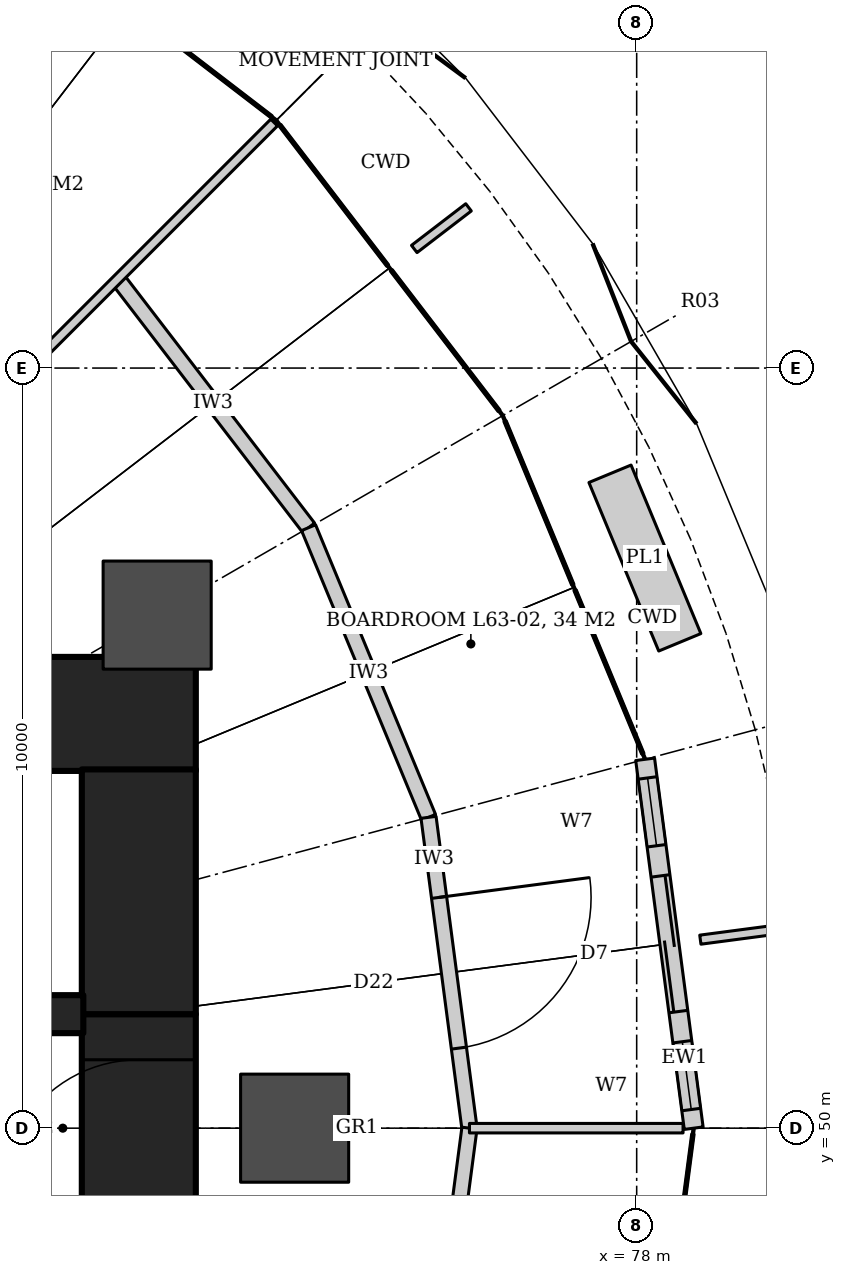
"""IFC4 building model, lengths in metres.
Left out: names, types, materials, properties, quantities, classifications, styles, units other than length and angle.
Written with IfcOpenShell. Run it as: python <this file> out.ifc"""

import sys

from ifc_helpers import new_model, si_unit, direction, frame, frame_2d, origin, origin_2d, place, context, subcontext, project, spatial, rectangle, hollow_circle, extrude, element, fill, save


model = new_model("IFC4")
c1 = context("Model", 3, precision=1e-05, world=origin(), true_north=direction((0.0, 1.0)))
c2 = subcontext(c1, "Body", "Model", "MODEL_VIEW")
j1 = project(units=[si_unit("LENGTHUNIT", "METRE"), si_unit("PLANEANGLEUNIT", "RADIAN")], contexts=[c1])
p1 = place(None, origin())
s1 = spatial("IfcSite", under=j1, at=p1, CompositionType="ELEMENT")
p2 = place(p1, origin())
s2 = spatial("IfcBuilding", under=s1, at=p2, CompositionType="ELEMENT")
p3 = place(p2, frame((0.0, 0.0, 269.6)))
s3 = spatial("IfcBuildingStorey", under=s2, at=p3, CompositionType="ELEMENT", Elevation=269.6)
p4 = place(p3, frame((64.6, 55.45, 0.0), z_axis=(0.0, 0.0, 1.0), x_axis=(1.0, 0.0, 0.0)))
e1 = element("IfcWall", 1, at=p4, inside=s3, PredefinedType="SHEAR", context=c2, shape_type="SweptSolid", body=[
    extrude(rectangle(XDim=7.6, YDim=1.5, at=frame_2d((3.8, 0.0))), origin(), (0.0, 0.0, 1.0), 4.2),
])
p5 = place(p3, frame((71.45, 48.5, 0.0), z_axis=(0.0, 0.0, 1.0), x_axis=(0.0, 1.0, 0.0)))
e2 = element("IfcWall", 2, at=p5, inside=s3, PredefinedType="SHEAR", context=c2, shape_type="SweptSolid", body=[
    extrude(rectangle(XDim=3.0, YDim=1.5, at=frame_2d((1.5, 0.0))), origin(), (0.0, 0.0, 1.0), 4.2),
])
p6 = place(p5, frame((0.6, 0.0, 0.0)))
e3 = element("IfcOpeningElement", 3, at=p6, cuts=e2, PredefinedType="OPENING", context=c2, shape_type="SweptSolid", body=[
    extrude(rectangle(XDim=1.8, YDim=2.1, at=frame_2d((0.9, 1.05))), frame((0.0, 0.76, 0.0), z_axis=(0.0, -1.0, 0.0), x_axis=(1.0, 0.0, 0.0)), (0.0, 0.0, 1.0), 1.52),
])
p7 = place(p3, frame((71.45, 51.5, 0.0), z_axis=(0.0, 0.0, 1.0), x_axis=(0.0, 1.0, 0.0)))
e4 = element("IfcWall", 4, at=p7, inside=s3, PredefinedType="SHEAR", context=c2, shape_type="SweptSolid", body=[
    extrude(rectangle(XDim=3.22, YDim=1.5, at=frame_2d((1.61, 0.0))), origin(), (0.0, 0.0, 1.0), 4.2),
])
p8 = place(p3, frame((64.6, 51.5, 0.0), z_axis=(0.0, 0.0, 1.0), x_axis=(1.0, 0.0, 0.0)))
e5 = element("IfcWall", 5, at=p8, inside=s3, PredefinedType="SHEAR", context=c2, shape_type="SweptSolid", body=[
    extrude(rectangle(XDim=6.12, YDim=0.35, at=frame_2d((3.06, 0.0))), origin(), (0.0, 0.0, 1.0), 4.2),
])
p9 = place(p8, frame((1.0, 0.0, 0.0)))
e6 = element("IfcOpeningElement", 6, at=p9, cuts=e5, PredefinedType="OPENING", context=c2, shape_type="SweptSolid", body=[
    extrude(rectangle(XDim=1.2, YDim=2.1, at=frame_2d((0.6, 1.05))), frame((0.0, 0.185, 0.0), z_axis=(0.0, -1.0, 0.0), x_axis=(1.0, 0.0, 0.0)), (0.0, 0.0, 1.0), 0.37),
])
p10 = place(p8, frame((4.2, 0.0, 0.0)))
e7 = element("IfcOpeningElement", 7, at=p10, cuts=e5, PredefinedType="OPENING", context=c2, shape_type="SweptSolid", body=[
    extrude(rectangle(XDim=1.2, YDim=2.1, at=frame_2d((0.6, 1.05))), frame((0.0, 0.185, 0.0), z_axis=(0.0, -1.0, 0.0), x_axis=(1.0, 0.0, 0.0)), (0.0, 0.0, 1.0), 0.37),
])
for number, where, z_axis, x_axis in (
    (8, (73.5, 50.0, 0.0), (0.0, 0.0, 1.0), (1.0, 0.0, 0.0)),
    (9, (71.691, 56.75, 0.0), (0.0, 0.0, 1.0), (1.0, 0.0, 0.0)),
):
    element("IfcColumn", number, at=place(p3, frame(where, z_axis=z_axis, x_axis=x_axis)), inside=s3, PredefinedType="COLUMN", context=c2, shape_type="SweptSolid", body=[
        extrude(hollow_circle(Radius=0.711, WallThickness=0.07, at=origin_2d()), origin(), (0.0, 0.0, 1.0), 4.2),
    ])
p11 = place(p3, frame((71.172, 61.172, 0.0), z_axis=(0.0, 0.0, 1.0), x_axis=(0.608714823874, -0.793389099494, 0.0)))
e10 = element("IfcWall", 10, at=p11, inside=s3, PredefinedType="PARTITIONING", context=c2, shape_type="SweptSolid", body=[
    extrude(rectangle(XDim=4.125, YDim=0.2, at=frame_2d((2.062, 0.0))), origin(), (0.0, 0.0, 1.0), 3.02),
])
p12 = place(p3, frame((73.683, 57.9, 0.0), z_axis=(0.0, 0.0, 1.0), x_axis=(0.382731667114, -0.923859551549, 0.0)))
e11 = element("IfcWall", 11, at=p12, inside=s3, PredefinedType="PARTITIONING", context=c2, shape_type="SweptSolid", body=[
    extrude(rectangle(XDim=4.125, YDim=0.2, at=frame_2d((2.062, 0.0))), origin(), (0.0, 0.0, 1.0), 3.02),
])
p13 = place(p3, frame((75.262, 54.089, 0.0), z_axis=(0.0, 0.0, 1.0), x_axis=(0.130515758099, -0.991446234996, 0.0)))
e12 = element("IfcWall", 12, at=p13, inside=s3, PredefinedType="PARTITIONING", context=c2, shape_type="SweptSolid", body=[
    extrude(rectangle(XDim=4.125, YDim=0.2, at=frame_2d((2.062, 0.0))), origin(), (0.0, 0.0, 1.0), 3.02),
])
p14 = place(p13, frame((1.062, 0.0, 0.0)))
e13 = element("IfcOpeningElement", 13, at=p14, cuts=e12, PredefinedType="OPENING", context=c2, shape_type="SweptSolid", body=[
    extrude(rectangle(XDim=2.0, YDim=2.7, at=frame_2d((1.0, 1.35))), frame((0.0, 0.11, 0.0), z_axis=(0.0, -1.0, 0.0), x_axis=(1.0, 0.0, 0.0)), (0.0, 0.0, 1.0), 0.22),
])
p15 = place(p3, frame((75.8, 50.0, 0.0), z_axis=(0.0, 0.0, 1.0), x_axis=(-0.130515758099, -0.991446234996, 0.0)))
e14 = element("IfcWall", 14, at=p15, inside=s3, PredefinedType="PARTITIONING", context=c2, shape_type="SweptSolid", body=[
    extrude(rectangle(XDim=4.125, YDim=0.2, at=frame_2d((2.062, 0.0))), origin(), (0.0, 0.0, 1.0), 3.02),
])
p16 = place(p3, frame((75.8, 50.0, 0.0), z_axis=(0.0, 0.0, 1.0), x_axis=(1.0, 0.0, 0.0)))
e15 = element("IfcWall", 15, at=p16, inside=s3, PredefinedType="PARTITIONING", context=c2, shape_type="SweptSolid", body=[
    extrude(rectangle(XDim=3.06, YDim=0.125, at=frame_2d((1.53, 0.0))), origin(), (0.0, 0.0, 1.0), 3.02),
])
p17 = place(p3, frame((68.0, 58.0, 0.0), z_axis=(0.0, 0.0, 1.0), x_axis=(0.707106781187, 0.707106781187, 0.0)))
e16 = element("IfcWall", 16, at=p17, inside=s3, PredefinedType="PARTITIONING", context=c2, shape_type="SweptSolid", body=[
    extrude(rectangle(XDim=7.646, YDim=0.125, at=frame_2d((3.823, 0.0))), origin(), (0.0, 0.0, 1.0), 3.02),
])
p18 = place(p3, frame((79.0, 50.0, 0.0), z_axis=(0.0, 0.0, 1.0), x_axis=(-0.130538549191, 0.991443234469, 0.0)))
e17 = element("IfcWall", 17, at=p18, inside=s3, PredefinedType="SOLIDWALL", context=c2, shape_type="SweptSolid", body=[
    extrude(rectangle(XDim=4.96, YDim=0.25, at=frame_2d((2.48, 0.0))), origin(), (0.0, 0.0, 1.0), 4.04),
])
p19 = place(p18, frame((1.58, 0.0, 0.0)))
e18 = element("IfcOpeningElement", 18, at=p19, cuts=e17, PredefinedType="OPENING", context=c2, shape_type="SweptSolid", body=[
    extrude(rectangle(XDim=1.8, YDim=2.4, at=frame_2d((0.9, 1.2))), frame((0.0, 0.135, 0.0), z_axis=(0.0, -1.0, 0.0), x_axis=(1.0, 0.0, 0.0)), (0.0, 0.0, 1.0), 0.27),
])
p20 = place(p18, frame((0.28, 0.0, 0.0)))
e19 = element("IfcOpeningElement", 19, at=p20, cuts=e17, PredefinedType="OPENING", context=c2, shape_type="SweptSolid", body=[
    extrude(rectangle(XDim=0.9, YDim=2.4, at=frame_2d((0.45, 1.2))), frame((0.0, 0.135, 0.0), z_axis=(0.0, -1.0, 0.0), x_axis=(1.0, 0.0, 0.0)), (0.0, 0.0, 1.0), 0.27),
])
p21 = place(p18, frame((3.78, 0.0, 0.0)))
e20 = element("IfcOpeningElement", 20, at=p21, cuts=e17, PredefinedType="OPENING", context=c2, shape_type="SweptSolid", body=[
    extrude(rectangle(XDim=0.9, YDim=2.4, at=frame_2d((0.45, 1.2))), frame((0.0, 0.135, 0.0), z_axis=(0.0, -1.0, 0.0), x_axis=(1.0, 0.0, 0.0)), (0.0, 0.0, 1.0), 0.27),
])
p22 = place(p14, origin())
e21 = element("IfcDoor", 21, at=p22, inside=s3, OperationType="DOUBLE_DOOR_DOUBLE_SWING", PredefinedType="DOOR", context=c2, shape_type="SweptSolid", body=[
    extrude(rectangle(XDim=2.0, YDim=2.7, at=frame_2d((1.0, 1.35))), frame((0.0, 0.025, 0.0), z_axis=(0.0, -1.0, 0.0), x_axis=(1.0, 0.0, 0.0)), (0.0, 0.0, 1.0), 0.05),
])
fill(e13, e21)
p23 = place(p19, origin())
e22 = element("IfcDoor", 22, at=p23, inside=s3, OperationType="DOUBLE_DOOR_SLIDING", PredefinedType="DOOR", context=c2, shape_type="SweptSolid", body=[
    extrude(rectangle(XDim=1.8, YDim=2.4, at=frame_2d((0.9, 1.2))), frame((0.0, 0.025, 0.0), z_axis=(0.0, -1.0, 0.0), x_axis=(1.0, 0.0, 0.0)), (0.0, 0.0, 1.0), 0.05),
])
fill(e18, e22)
p24 = place(p20, origin())
e23 = element("IfcWindow", 23, at=p24, inside=s3, PartitioningType="SINGLE_PANEL", PredefinedType="WINDOW", context=c2, shape_type="SweptSolid", body=[
    extrude(rectangle(XDim=0.9, YDim=2.4, at=frame_2d((0.45, 1.2))), frame((0.0, 0.03, 0.0), z_axis=(0.0, -1.0, 0.0), x_axis=(1.0, 0.0, 0.0)), (0.0, 0.0, 1.0), 0.06),
])
fill(e19, e23)
p25 = place(p21, origin())
e24 = element("IfcWindow", 24, at=p25, inside=s3, PartitioningType="SINGLE_PANEL", PredefinedType="WINDOW", context=c2, shape_type="SweptSolid", body=[
    extrude(rectangle(XDim=0.9, YDim=2.4, at=frame_2d((0.45, 1.2))), frame((0.0, 0.03, 0.0), z_axis=(0.0, -1.0, 0.0), x_axis=(1.0, 0.0, 0.0)), (0.0, 0.0, 1.0), 0.06),
])
fill(e20, e24)
p26 = place(p6, origin())
e25 = element("IfcDoor", 25, at=p26, inside=s3, OperationType="DOUBLE_DOOR_DOUBLE_SWING", PredefinedType="DOOR", context=c2, shape_type="SweptSolid", body=[
    extrude(rectangle(XDim=1.8, YDim=2.1, at=frame_2d((0.9, 1.05))), frame((0.0, 0.025, 0.0), z_axis=(0.0, -1.0, 0.0), x_axis=(1.0, 0.0, 0.0)), (0.0, 0.0, 1.0), 0.05),
])
fill(e3, e25)
save(model, sys.argv[1])
